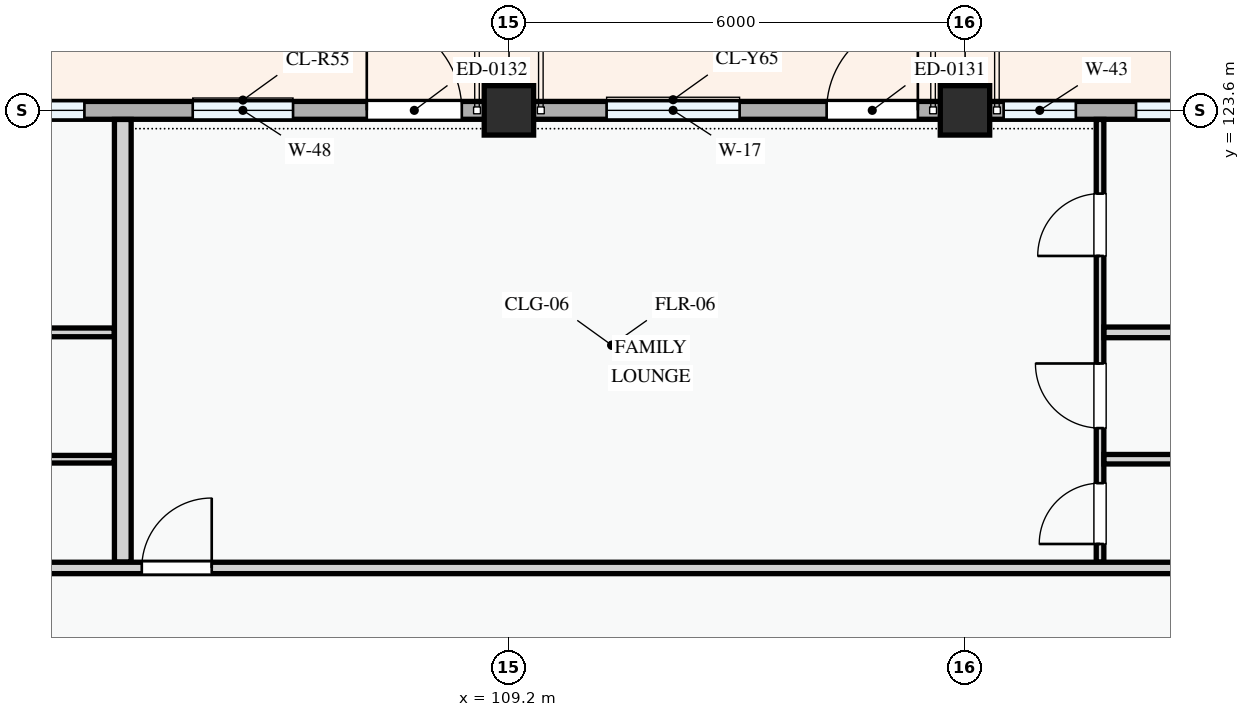
"""IFC4 building model, lengths in metres.
Left out: names, types, materials, properties, quantities, classifications, styles, units other than length and angle.
Written with IfcOpenShell. Run it as: python <this file> out.ifc"""

import sys

from ifc_helpers import new_model, si_unit, direction, frame, frame_2d, origin, origin_2d, place, context, subcontext, project, spatial, rectangle, extrude, element, fill, save


model = new_model("IFC4")
c1 = context("Model", 3, precision=1e-05, world=origin(), true_north=direction((0.0, 1.0)))
c2 = subcontext(c1, "Body", "Model", "MODEL_VIEW")
j1 = project(units=[si_unit("LENGTHUNIT", "METRE"), si_unit("PLANEANGLEUNIT", "RADIAN")], contexts=[c1])
p1 = place(None, origin())
s1 = spatial("IfcSite", under=j1, at=p1, CompositionType="ELEMENT")
p2 = place(p1, origin())
s2 = spatial("IfcBuilding", under=s1, at=p2, CompositionType="ELEMENT")
p3 = place(p2, frame((0.0, 0.0, 8.1)))
s3 = spatial("IfcBuildingStorey", under=s2, at=p3, CompositionType="ELEMENT", Elevation=8.1)
for number, where, z_axis, x_axis in (
    (1, (109.2, 123.6, 0.0), (0.0, 0.0, 1.0), (1.0, 0.0, 0.0)),
    (2, (115.2, 123.6, 0.0), (0.0, 0.0, 1.0), (1.0, 0.0, 0.0)),
):
    element("IfcColumn", number, at=place(p3, frame(where, z_axis=z_axis, x_axis=x_axis)), inside=s3, PredefinedType="COLUMN", context=c2, shape_type="SweptSolid", body=[
        extrude(rectangle(XDim=0.65, YDim=0.65, at=origin_2d()), origin(), (0.0, 0.0, 1.0), 3.3),
    ])
p4 = place(p3, frame((123.6, 123.6, 0.0), z_axis=(0.0, 0.0, 1.0), x_axis=(-1.0, 0.0, 0.0)))
e3 = element("IfcWall", 3, at=p4, inside=s3, PredefinedType="STANDARD", context=c2, shape_type="SweptSolid", body=[
    extrude(rectangle(XDim=8.4, YDim=0.235, at=frame_2d((4.2, 0.0))), origin(), (0.0, 0.0, 1.0), 2.345),
])
p5 = place(p4, frame((0.62, 0.0, 0.0)))
e4 = element("IfcOpeningElement", 4, at=p5, cuts=e3, PredefinedType="OPENING", context=c2, shape_type="SweptSolid", body=[
    extrude(rectangle(XDim=1.1, YDim=2.15, at=frame_2d((0.55, 1.075))), frame((0.0, 0.127, 0.0), z_axis=(0.0, -1.0, 0.0), x_axis=(1.0, 0.0, 0.0)), (0.0, 0.0, 1.0), 0.255),
])
p6 = place(p4, frame((2.058, 0.0, 0.78)))
e5 = element("IfcOpeningElement", 5, at=p6, cuts=e3, PredefinedType="OPENING", context=c2, shape_type="SweptSolid", body=[
    extrude(rectangle(XDim=1.92, YDim=1.44, at=frame_2d((0.96, 0.72))), frame((0.0, 0.127, 0.0), z_axis=(0.0, -1.0, 0.0), x_axis=(1.0, 0.0, 0.0)), (0.0, 0.0, 1.0), 0.255),
])
p7 = place(p4, frame((4.6, 0.0, 0.78)))
e6 = element("IfcOpeningElement", 6, at=p7, cuts=e3, PredefinedType="OPENING", context=c2, shape_type="SweptSolid", body=[
    extrude(rectangle(XDim=1.55, YDim=1.4, at=frame_2d((0.775, 0.7))), frame((0.0, 0.127, 0.0), z_axis=(0.0, -1.0, 0.0), x_axis=(1.0, 0.0, 0.0)), (0.0, 0.0, 1.0), 0.255),
])
p8 = place(p4, frame((6.942, 0.0, 0.78)))
e7 = element("IfcOpeningElement", 7, at=p8, cuts=e3, PredefinedType="OPENING", context=c2, shape_type="SweptSolid", body=[
    extrude(rectangle(XDim=0.95, YDim=1.15, at=frame_2d((0.475, 0.575))), frame((0.0, 0.127, 0.0), z_axis=(0.0, -1.0, 0.0), x_axis=(1.0, 0.0, 0.0)), (0.0, 0.0, 1.0), 0.255),
])
p9 = place(p3, frame((115.2, 123.6, 0.0), z_axis=(0.0, 0.0, 1.0), x_axis=(-1.0, 0.0, 0.0)))
e8 = element("IfcWall", 8, at=p9, inside=s3, PredefinedType="STANDARD", context=c2, shape_type="SweptSolid", body=[
    extrude(rectangle(XDim=6.0, YDim=0.235, at=frame_2d((3.0, 0.0))), origin(), (0.0, 0.0, 1.0), 2.445),
])
p10 = place(p9, frame((0.62, 0.0, 0.0)))
e9 = element("IfcOpeningElement", 9, at=p10, cuts=e8, PredefinedType="OPENING", context=c2, shape_type="SweptSolid", body=[
    extrude(rectangle(XDim=1.2, YDim=2.15, at=frame_2d((0.6, 1.075))), frame((0.0, 0.127, 0.0), z_axis=(0.0, -1.0, 0.0), x_axis=(1.0, 0.0, 0.0)), (0.0, 0.0, 1.0), 0.255),
])
p11 = place(p9, frame((2.965, 0.0, 0.78)))
e10 = element("IfcOpeningElement", 10, at=p11, cuts=e8, PredefinedType="OPENING", context=c2, shape_type="SweptSolid", body=[
    extrude(rectangle(XDim=1.75, YDim=1.45, at=frame_2d((0.875, 0.725))), frame((0.0, 0.127, 0.0), z_axis=(0.0, -1.0, 0.0), x_axis=(1.0, 0.0, 0.0)), (0.0, 0.0, 1.0), 0.255),
])
p12 = place(p3, frame((109.2, 123.6, 0.0), z_axis=(0.0, 0.0, 1.0), x_axis=(-1.0, 0.0, 0.0)))
e11 = element("IfcWall", 11, at=p12, inside=s3, PredefinedType="STANDARD", context=c2, shape_type="SweptSolid", body=[
    extrude(rectangle(XDim=8.4, YDim=0.235, at=frame_2d((4.2, 0.0))), origin(), (0.0, 0.0, 1.0), 2.345),
])
p13 = place(p12, frame((0.62, 0.0, 0.0)))
e12 = element("IfcOpeningElement", 12, at=p13, cuts=e11, PredefinedType="OPENING", context=c2, shape_type="SweptSolid", body=[
    extrude(rectangle(XDim=1.25, YDim=2.2, at=frame_2d((0.625, 1.1))), frame((0.0, 0.127, 0.0), z_axis=(0.0, -1.0, 0.0), x_axis=(1.0, 0.0, 0.0)), (0.0, 0.0, 1.0), 0.255),
])
p14 = place(p12, frame((2.84, 0.0, 0.78)))
e13 = element("IfcOpeningElement", 13, at=p14, cuts=e11, PredefinedType="OPENING", context=c2, shape_type="SweptSolid", body=[
    extrude(rectangle(XDim=1.32, YDim=1.35, at=frame_2d((0.66, 0.675))), frame((0.0, 0.127, 0.0), z_axis=(0.0, -1.0, 0.0), x_axis=(1.0, 0.0, 0.0)), (0.0, 0.0, 1.0), 0.255),
])
p15 = place(p12, frame((5.585, 0.0, 0.78)))
e14 = element("IfcOpeningElement", 14, at=p15, cuts=e11, PredefinedType="OPENING", context=c2, shape_type="SweptSolid", body=[
    extrude(rectangle(XDim=2.12, YDim=1.44, at=frame_2d((1.06, 0.72))), frame((0.0, 0.127, 0.0), z_axis=(0.0, -1.0, 0.0), x_axis=(1.0, 0.0, 0.0)), (0.0, 0.0, 1.0), 0.255),
])
p16 = place(p3, frame((91.881, 120.679, 0.0), z_axis=(0.0, 0.0, 1.0), x_axis=(1.0, 0.0, 0.0)))
e15 = element("IfcWall", 15, at=p16, inside=s3, PredefinedType="PARTITIONING", context=c2, shape_type="SweptSolid", body=[
    extrude(rectangle(XDim=12.127, YDim=0.115, at=frame_2d((6.063, 0.0))), origin(), (0.0, 0.0, 1.0), 3.0),
])
p17 = place(p3, frame((91.881, 119.01, 0.0), z_axis=(0.0, 0.0, 1.0), x_axis=(1.0, 0.0, 0.0)))
e16 = element("IfcWall", 16, at=p17, inside=s3, PredefinedType="PARTITIONING", context=c2, shape_type="SweptSolid", body=[
    extrude(rectangle(XDim=12.127, YDim=0.1, at=frame_2d((6.063, 0.0))), origin(), (0.0, 0.0, 1.0), 3.0),
])
p18 = place(p3, frame((116.977, 117.657, 0.0), z_axis=(0.0, 0.0, 1.0), x_axis=(0.0, 1.0, 0.0)))
e17 = element("IfcWall", 17, at=p18, inside=s3, PredefinedType="PARTITIONING", context=c2, shape_type="SweptSolid", body=[
    extrude(rectangle(XDim=5.823, YDim=0.1, at=frame_2d((2.912, 0.0))), origin(), (0.0, 0.0, 1.0), 3.0),
])
p19 = place(p18, frame((0.238, 0.0, 0.0)))
e18 = element("IfcOpeningElement", 18, at=p19, cuts=e17, PredefinedType="OPENING", context=c2, shape_type="SweptSolid", body=[
    extrude(rectangle(XDim=0.8, YDim=2.1, at=frame_2d((0.4, 1.05))), frame((0.0, 0.06, 0.0), z_axis=(0.0, -1.0, 0.0), x_axis=(1.0, 0.0, 0.0)), (0.0, 0.0, 1.0), 0.12),
])
p20 = place(p18, frame((1.763, 0.0, 0.0)))
e19 = element("IfcOpeningElement", 19, at=p20, cuts=e17, PredefinedType="OPENING", context=c2, shape_type="SweptSolid", body=[
    extrude(rectangle(XDim=0.85, YDim=2.1, at=frame_2d((0.425, 1.05))), frame((0.0, 0.06, 0.0), z_axis=(0.0, -1.0, 0.0), x_axis=(1.0, 0.0, 0.0)), (0.0, 0.0, 1.0), 0.12),
])
p21 = place(p18, frame((4.028, 0.0, 0.0)))
e20 = element("IfcOpeningElement", 20, at=p21, cuts=e17, PredefinedType="OPENING", context=c2, shape_type="SweptSolid", body=[
    extrude(rectangle(XDim=0.82, YDim=2.08, at=frame_2d((0.41, 1.04))), frame((0.0, 0.06, 0.0), z_axis=(0.0, -1.0, 0.0), x_axis=(1.0, 0.0, 0.0)), (0.0, 0.0, 1.0), 0.12),
])
p22 = place(p3, frame((117.029, 120.679, 0.0), z_axis=(0.0, 0.0, 1.0), x_axis=(1.0, 0.0, 0.0)))
e21 = element("IfcWall", 21, at=p22, inside=s3, PredefinedType="PARTITIONING", context=c2, shape_type="SweptSolid", body=[
    extrude(rectangle(XDim=10.649, YDim=0.14, at=frame_2d((5.325, 0.0))), origin(), (0.0, 0.0, 1.0), 3.0),
])
p23 = place(p3, frame((117.029, 119.01, 0.0), z_axis=(0.0, 0.0, 1.0), x_axis=(1.0, 0.0, 0.0)))
e22 = element("IfcWall", 22, at=p23, inside=s3, PredefinedType="PARTITIONING", context=c2, shape_type="SweptSolid", body=[
    extrude(rectangle(XDim=10.649, YDim=0.125, at=frame_2d((5.325, 0.0))), origin(), (0.0, 0.0, 1.0), 3.0),
])
p24 = place(p3, frame((104.12, 117.657, 0.0), z_axis=(0.0, 0.0, 1.0), x_axis=(0.0, 1.0, 0.0)))
e23 = element("IfcWall", 23, at=p24, inside=s3, PredefinedType="PARTITIONING", context=c2, shape_type="SweptSolid", body=[
    extrude(rectangle(XDim=5.823, YDim=0.22, at=frame_2d((2.912, 0.0))), origin(), (0.0, 0.0, 1.0), 3.0),
])
p25 = place(p3, frame((80.52, 117.58, 0.0), z_axis=(0.0, 0.0, 1.0), x_axis=(1.0, 0.0, 0.0)))
e24 = element("IfcWall", 24, at=p25, inside=s3, PredefinedType="PARTITIONING", context=c2, shape_type="SweptSolid", body=[
    extrude(rectangle(XDim=72.021, YDim=0.15, at=frame_2d((36.01, 0.0))), origin(), (0.0, 0.0, 1.0), 3.0),
])
p26 = place(p25, frame((9.469, 0.0, 0.0)))
e25 = element("IfcOpeningElement", 25, at=p26, cuts=e24, PredefinedType="OPENING", context=c2, shape_type="SweptSolid", body=[
    extrude(rectangle(XDim=0.92, YDim=2.1, at=frame_2d((0.46, 1.05))), frame((0.0, 0.085, 0.0), z_axis=(0.0, -1.0, 0.0), x_axis=(1.0, 0.0, 0.0)), (0.0, 0.0, 1.0), 0.17),
])
p27 = place(p25, frame((23.851, 0.0, 0.0)))
e26 = element("IfcOpeningElement", 26, at=p27, cuts=e24, PredefinedType="OPENING", context=c2, shape_type="SweptSolid", body=[
    extrude(rectangle(XDim=0.92, YDim=2.1, at=frame_2d((0.46, 1.05))), frame((0.0, 0.085, 0.0), z_axis=(0.0, -1.0, 0.0), x_axis=(1.0, 0.0, 0.0)), (0.0, 0.0, 1.0), 0.17),
])
p28 = place(p25, frame((52.775, 0.0, 0.0)))
e27 = element("IfcOpeningElement", 27, at=p28, cuts=e24, PredefinedType="OPENING", context=c2, shape_type="SweptSolid", body=[
    extrude(rectangle(XDim=0.92, YDim=2.1, at=frame_2d((0.46, 1.05))), frame((0.0, 0.085, 0.0), z_axis=(0.0, -1.0, 0.0), x_axis=(1.0, 0.0, 0.0)), (0.0, 0.0, 1.0), 0.17),
])
p29 = place(p7, origin())
e28 = element("IfcWindow", 28, at=p29, inside=s3, PartitioningType="SINGLE_PANEL", PredefinedType="WINDOW", context=c2, shape_type="SweptSolid", body=[
    extrude(rectangle(XDim=1.55, YDim=1.4, at=frame_2d((0.775, 0.7))), frame((0.0, 0.03, 0.0), z_axis=(0.0, -1.0, 0.0), x_axis=(1.0, 0.0, 0.0)), (0.0, 0.0, 1.0), 0.06),
])
fill(e6, e28)
p30 = place(p8, origin())
e29 = element("IfcWindow", 29, at=p30, inside=s3, PartitioningType="SINGLE_PANEL", PredefinedType="WINDOW", context=c2, shape_type="SweptSolid", body=[
    extrude(rectangle(XDim=0.95, YDim=1.15, at=frame_2d((0.475, 0.575))), frame((0.0, 0.03, 0.0), z_axis=(0.0, -1.0, 0.0), x_axis=(1.0, 0.0, 0.0)), (0.0, 0.0, 1.0), 0.06),
])
fill(e7, e29)
p31 = place(p10, frame((1.2, 0.0, 0.0), z_axis=(0.0, 0.0, 1.0), x_axis=(-1.0, 0.0, 0.0)))
e30 = element("IfcDoor", 30, at=p31, inside=s3, OperationType="SINGLE_SWING_RIGHT", PredefinedType="DOOR", context=c2, shape_type="SweptSolid", body=[
    extrude(rectangle(XDim=1.2, YDim=2.15, at=frame_2d((0.6, 1.075))), frame((0.0, 0.025, 0.0), z_axis=(0.0, -1.0, 0.0), x_axis=(1.0, 0.0, 0.0)), (0.0, 0.0, 1.0), 0.05),
])
fill(e9, e30)
p32 = place(p11, origin())
e31 = element("IfcWindow", 31, at=p32, inside=s3, PartitioningType="DOUBLE_PANEL_VERTICAL", PredefinedType="WINDOW", context=c2, shape_type="SweptSolid", body=[
    extrude(rectangle(XDim=1.75, YDim=1.45, at=frame_2d((0.875, 0.725))), frame((0.0, 0.03, 0.0), z_axis=(0.0, -1.0, 0.0), x_axis=(1.0, 0.0, 0.0)), (0.0, 0.0, 1.0), 0.06),
])
fill(e10, e31)
p33 = place(p13, frame((1.25, 0.0, 0.0), z_axis=(0.0, 0.0, 1.0), x_axis=(-1.0, 0.0, 0.0)))
e32 = element("IfcDoor", 32, at=p33, inside=s3, OperationType="SINGLE_SWING_LEFT", PredefinedType="DOOR", context=c2, shape_type="SweptSolid", body=[
    extrude(rectangle(XDim=1.25, YDim=2.2, at=frame_2d((0.625, 1.1))), frame((0.0, 0.025, 0.0), z_axis=(0.0, -1.0, 0.0), x_axis=(1.0, 0.0, 0.0)), (0.0, 0.0, 1.0), 0.05),
])
fill(e12, e32)
p34 = place(p14, origin())
e33 = element("IfcWindow", 33, at=p34, inside=s3, PartitioningType="SINGLE_PANEL", PredefinedType="WINDOW", context=c2, shape_type="SweptSolid", body=[
    extrude(rectangle(XDim=1.32, YDim=1.35, at=frame_2d((0.66, 0.675))), frame((0.0, 0.03, 0.0), z_axis=(0.0, -1.0, 0.0), x_axis=(1.0, 0.0, 0.0)), (0.0, 0.0, 1.0), 0.06),
])
fill(e13, e33)
p35 = place(p15, origin())
e34 = element("IfcWindow", 34, at=p35, inside=s3, PartitioningType="DOUBLE_PANEL_VERTICAL", PredefinedType="WINDOW", context=c2, shape_type="SweptSolid", body=[
    extrude(rectangle(XDim=2.12, YDim=1.44, at=frame_2d((1.06, 0.72))), frame((0.0, 0.03, 0.0), z_axis=(0.0, -1.0, 0.0), x_axis=(1.0, 0.0, 0.0)), (0.0, 0.0, 1.0), 0.06),
])
fill(e14, e34)
p36 = place(p19, origin())
e35 = element("IfcDoor", 35, at=p36, inside=s3, OperationType="SINGLE_SWING_LEFT", PredefinedType="DOOR", context=c2, shape_type="SweptSolid", body=[
    extrude(rectangle(XDim=0.8, YDim=2.1, at=frame_2d((0.4, 1.05))), frame((0.0, 0.025, 0.0), z_axis=(0.0, -1.0, 0.0), x_axis=(1.0, 0.0, 0.0)), (0.0, 0.0, 1.0), 0.05),
])
fill(e18, e35)
p37 = place(p20, origin())
e36 = element("IfcDoor", 36, at=p37, inside=s3, OperationType="SINGLE_SWING_RIGHT", PredefinedType="DOOR", context=c2, shape_type="SweptSolid", body=[
    extrude(rectangle(XDim=0.85, YDim=2.1, at=frame_2d((0.425, 1.05))), frame((0.0, 0.025, 0.0), z_axis=(0.0, -1.0, 0.0), x_axis=(1.0, 0.0, 0.0)), (0.0, 0.0, 1.0), 0.05),
])
fill(e19, e36)
p38 = place(p21, origin())
e37 = element("IfcDoor", 37, at=p38, inside=s3, OperationType="SINGLE_SWING_LEFT", PredefinedType="DOOR", context=c2, shape_type="SweptSolid", body=[
    extrude(rectangle(XDim=0.82, YDim=2.08, at=frame_2d((0.41, 1.04))), frame((0.0, 0.025, 0.0), z_axis=(0.0, -1.0, 0.0), x_axis=(1.0, 0.0, 0.0)), (0.0, 0.0, 1.0), 0.05),
])
fill(e20, e37)
p39 = place(p27, origin())
e38 = element("IfcDoor", 38, at=p39, inside=s3, OperationType="SINGLE_SWING_RIGHT", PredefinedType="DOOR", context=c2, shape_type="SweptSolid", body=[
    extrude(rectangle(XDim=0.92, YDim=2.1, at=frame_2d((0.46, 1.05))), frame((0.0, 0.025, 0.0), z_axis=(0.0, -1.0, 0.0), x_axis=(1.0, 0.0, 0.0)), (0.0, 0.0, 1.0), 0.05),
])
fill(e26, e38)
save(model, sys.argv[1])
